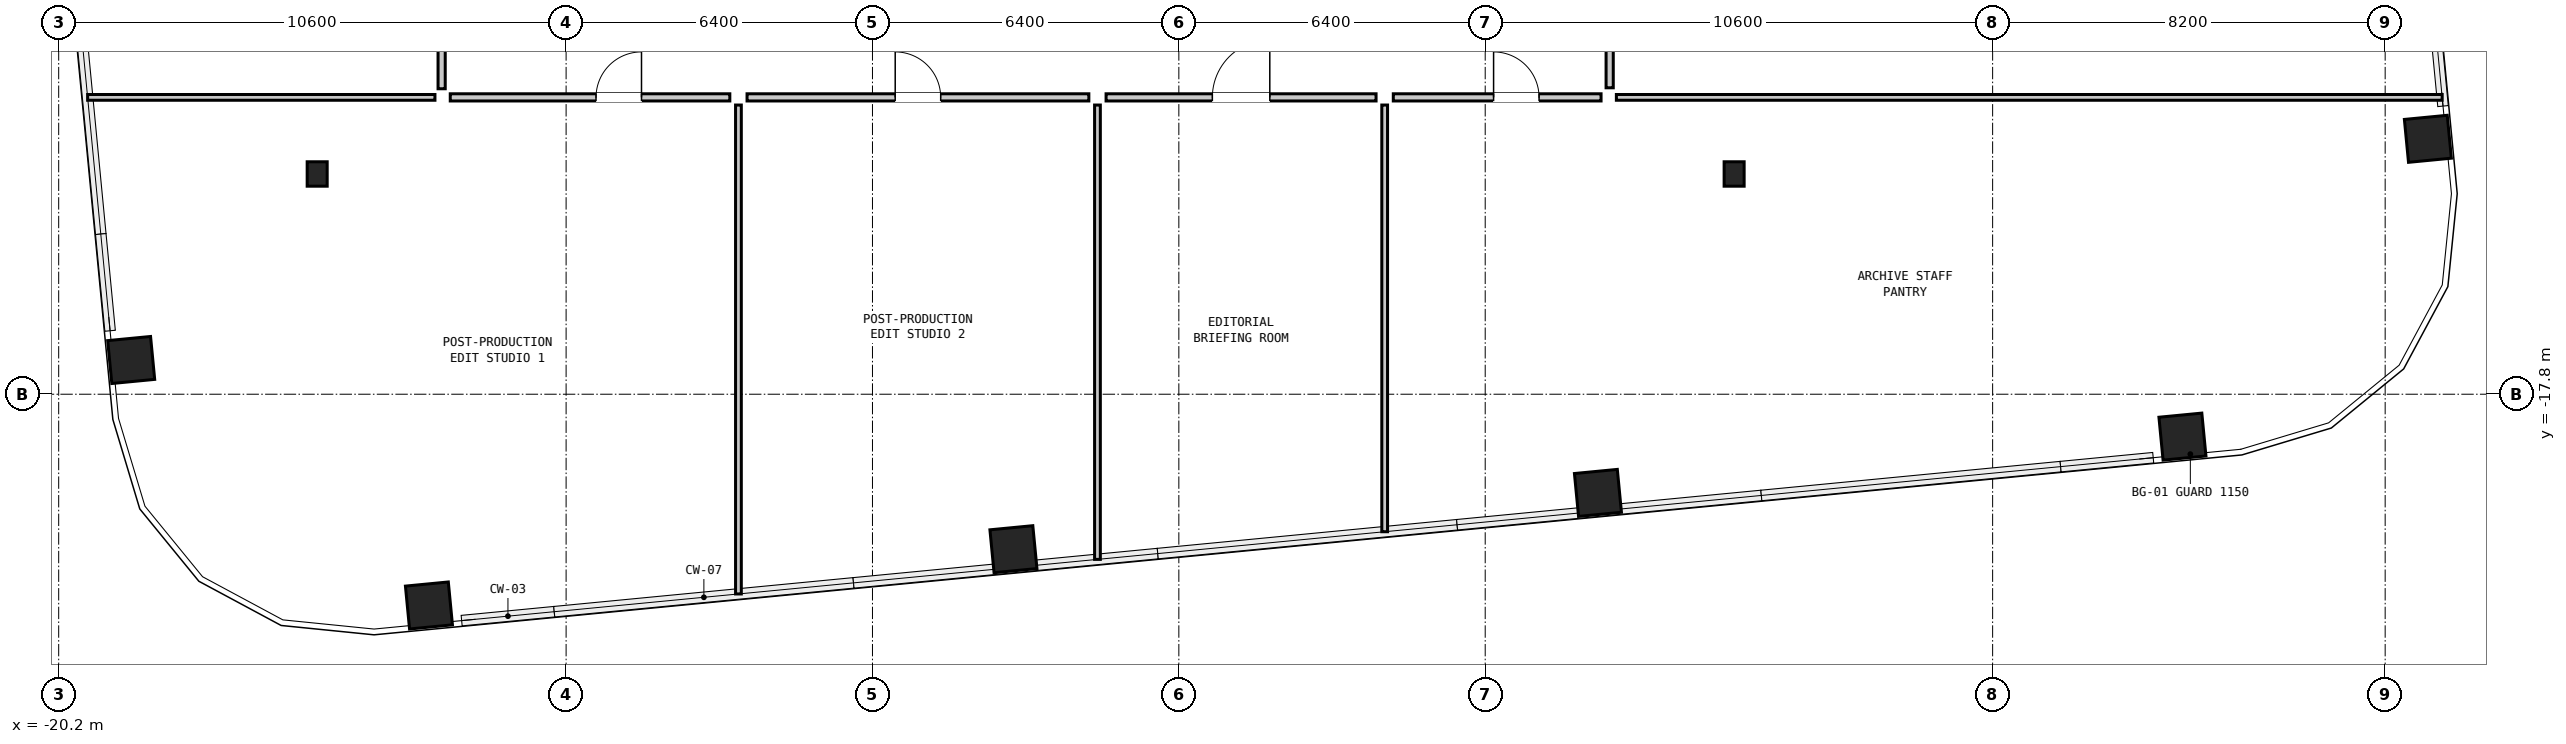
"""IFC4 building model, lengths in metres.
Left out: names, types, materials, properties, quantities, classifications, styles, units other than length and angle.
Written with IfcOpenShell. Run it as: python <this file> out.ifc"""

import sys

from ifc_helpers import new_model, si_unit, direction, frame, frame_2d, origin, origin_2d, place, context, subcontext, project, spatial, rectangle, hollow_rectangle, i_section, extrude, element, fill, save


model = new_model("IFC4")
c1 = context("Model", 3, precision=1e-05, world=origin(), true_north=direction((0.0, 1.0)))
c2 = subcontext(c1, "Body", "Model", "MODEL_VIEW")
j1 = project(units=[si_unit("LENGTHUNIT", "METRE"), si_unit("PLANEANGLEUNIT", "RADIAN")], contexts=[c1])
p1 = place(None, origin())
s1 = spatial("IfcSite", under=j1, at=p1, CompositionType="ELEMENT")
p2 = place(p1, origin())
s2 = spatial("IfcBuilding", under=s1, at=p2, CompositionType="ELEMENT")
p3 = place(p2, frame((0.0, 0.0, 90.8)))
s3 = spatial("IfcBuildingStorey", under=s2, at=p3, CompositionType="ELEMENT", Elevation=90.8)
for number, where, z_axis, x_axis in (
    (1, (-12.465, -22.213, 0.0), (0.0, 0.0, 1.0), (0.995, 0.096, 0.0)),
    (2, (-0.255, -21.037, 0.0), (0.0, 0.0, 1.0), (0.995, 0.096, 0.0)),
    (3, (11.955, -19.861, 0.0), (0.0, 0.0, 1.0), (0.995, 0.096, 0.0)),
    (4, (24.165, -18.686, 0.0), (0.0, 0.0, 1.0), (0.995, 0.096, 0.0)),
    (5, (29.292, -12.465, 0.0), (0.0, 0.0, 1.0), (-0.096, 0.995, 0.0)),
    (6, (-18.686, -17.085, 0.0), (0.0, 0.0, 1.0), (-0.096, 0.995, 0.0)),
):
    element("IfcColumn", number, at=place(p3, frame(where, z_axis=z_axis, x_axis=x_axis)), inside=s3, PredefinedType="COLUMN", context=c2, shape_type="SweptSolid", body=[
        extrude(hollow_rectangle(XDim=0.9, YDim=0.9, WallThickness=0.055, at=origin_2d()), origin(), (0.0, 0.0, 1.0), 3.05),
    ])
for number, where, z_axis, x_axis in (
    (7, (-14.8, -13.2, 0.0), (0.0, 0.0, 1.0), (1.0, 0.0, 0.0)),
    (8, (14.8, -13.2, 0.0), (0.0, 0.0, 1.0), (1.0, 0.0, 0.0)),
):
    element("IfcColumn", number, at=place(p3, frame(where, z_axis=z_axis, x_axis=x_axis)), inside=s3, PredefinedType="COLUMN", context=c2, shape_type="SweptSolid", body=[
        extrude(i_section(OverallWidth=0.418, OverallDepth=0.51, WebThickness=0.042, FlangeThickness=0.068, at=origin_2d()), origin(), (0.0, 0.0, 1.0), 3.05),
    ])
p4 = place(p3, frame((-19.595, -11.6, 0.0), z_axis=(0.0, 0.0, 1.0), x_axis=(1.0, 0.0, 0.0)))
e9 = element("IfcWall", 9, at=p4, inside=s3, PredefinedType="PARTITIONING", context=c2, shape_type="SweptSolid", body=[
    extrude(rectangle(XDim=7.255, YDim=0.12, at=frame_2d((3.628, 0.0))), origin(), (0.0, 0.0, 1.0), 2.274),
])
p5 = place(p3, frame((12.34, -11.6, 0.0), z_axis=(0.0, 0.0, 1.0), x_axis=(1.0, 0.0, 0.0)))
e10 = element("IfcWall", 10, at=p5, inside=s3, PredefinedType="PARTITIONING", context=c2, shape_type="SweptSolid", body=[
    extrude(rectangle(XDim=17.251, YDim=0.12, at=frame_2d((8.625, 0.0))), origin(), (0.0, 0.0, 1.0), 2.274),
])
p6 = place(p3, frame((-6.0, -21.972, 0.0), z_axis=(0.0, 0.0, 1.0), x_axis=(0.0, 1.0, 0.0)))
e11 = element("IfcWall", 11, at=p6, inside=s3, PredefinedType="PARTITIONING", context=c2, shape_type="SweptSolid", body=[
    extrude(rectangle(XDim=10.212, YDim=0.12, at=frame_2d((5.106, 0.0))), origin(), (0.0, 0.0, 1.0), 2.274),
])
p7 = place(p3, frame((1.5, -21.25, 0.0), z_axis=(0.0, 0.0, 1.0), x_axis=(0.0, 1.0, 0.0)))
e12 = element("IfcWall", 12, at=p7, inside=s3, PredefinedType="PARTITIONING", context=c2, shape_type="SweptSolid", body=[
    extrude(rectangle(XDim=9.49, YDim=0.12, at=frame_2d((4.745, 0.0))), origin(), (0.0, 0.0, 1.0), 2.83),
])
p8 = place(p3, frame((7.5, -20.672, 0.0), z_axis=(0.0, 0.0, 1.0), x_axis=(0.0, 1.0, 0.0)))
e13 = element("IfcWall", 13, at=p8, inside=s3, PredefinedType="PARTITIONING", context=c2, shape_type="SweptSolid", body=[
    extrude(rectangle(XDim=8.912, YDim=0.12, at=frame_2d((4.456, 0.0))), origin(), (0.0, 0.0, 1.0), 2.83),
])
p9 = place(p3, frame((-12.02, -11.6, 0.0), z_axis=(0.0, 0.0, 1.0), x_axis=(1.0, 0.0, 0.0)))
e14 = element("IfcWall", 14, at=p9, inside=s3, PredefinedType="PARTITIONING", context=c2, shape_type="SweptSolid", body=[
    extrude(rectangle(XDim=5.84, YDim=0.15, at=frame_2d((2.92, 0.0))), origin(), (0.0, 0.0, 1.0), 2.274),
])
p10 = place(p9, frame((3.045, 0.0, 0.0)))
e15 = element("IfcOpeningElement", 15, at=p10, cuts=e14, PredefinedType="OPENING", context=c2, shape_type="SweptSolid", body=[
    extrude(rectangle(XDim=0.95, YDim=2.1, at=frame_2d((0.475, 1.05))), frame((0.0, 0.087, 0.0), z_axis=(0.0, -1.0, 0.0), x_axis=(1.0, 0.0, 0.0)), (0.0, 0.0, 1.0), 0.174),
])
p11 = place(p3, frame((-5.82, -11.6, 0.0), z_axis=(0.0, 0.0, 1.0), x_axis=(1.0, 0.0, 0.0)))
e16 = element("IfcWall", 16, at=p11, inside=s3, PredefinedType="PARTITIONING", context=c2, shape_type="SweptSolid", body=[
    extrude(rectangle(XDim=7.14, YDim=0.15, at=frame_2d((3.57, 0.0))), origin(), (0.0, 0.0, 1.0), 2.83),
])
p12 = place(p11, frame((3.095, 0.0, 0.0)))
e17 = element("IfcOpeningElement", 17, at=p12, cuts=e16, PredefinedType="OPENING", context=c2, shape_type="SweptSolid", body=[
    extrude(rectangle(XDim=0.95, YDim=2.1, at=frame_2d((0.475, 1.05))), frame((0.0, 0.087, 0.0), z_axis=(0.0, -1.0, 0.0), x_axis=(1.0, 0.0, 0.0)), (0.0, 0.0, 1.0), 0.174),
])
p13 = place(p3, frame((1.68, -11.6, 0.0), z_axis=(0.0, 0.0, 1.0), x_axis=(1.0, 0.0, 0.0)))
e18 = element("IfcWall", 18, at=p13, inside=s3, PredefinedType="PARTITIONING", context=c2, shape_type="SweptSolid", body=[
    extrude(rectangle(XDim=5.64, YDim=0.15, at=frame_2d((2.82, 0.0))), origin(), (0.0, 0.0, 1.0), 2.83),
])
p14 = place(p13, frame((2.22, 0.0, 0.0)))
e19 = element("IfcOpeningElement", 19, at=p14, cuts=e18, PredefinedType="OPENING", context=c2, shape_type="SweptSolid", body=[
    extrude(rectangle(XDim=1.2, YDim=2.1, at=frame_2d((0.6, 1.05))), frame((0.0, 0.087, 0.0), z_axis=(0.0, -1.0, 0.0), x_axis=(1.0, 0.0, 0.0)), (0.0, 0.0, 1.0), 0.174),
])
p15 = place(p3, frame((7.68, -11.6, 0.0), z_axis=(0.0, 0.0, 1.0), x_axis=(1.0, 0.0, 0.0)))
e20 = element("IfcWall", 20, at=p15, inside=s3, PredefinedType="PARTITIONING", context=c2, shape_type="SweptSolid", body=[
    extrude(rectangle(XDim=4.34, YDim=0.15, at=frame_2d((2.17, 0.0))), origin(), (0.0, 0.0, 1.0), 2.274),
])
p16 = place(p15, frame((2.095, 0.0, 0.0)))
e21 = element("IfcOpeningElement", 21, at=p16, cuts=e20, PredefinedType="OPENING", context=c2, shape_type="SweptSolid", body=[
    extrude(rectangle(XDim=0.95, YDim=2.1, at=frame_2d((0.475, 1.05))), frame((0.0, 0.087, 0.0), z_axis=(0.0, -1.0, 0.0), x_axis=(1.0, 0.0, 0.0)), (0.0, 0.0, 1.0), 0.174),
])
p17 = place(p3, frame((-12.2, -11.42, 0.0), z_axis=(0.0, 0.0, 1.0), x_axis=(0.0, 1.0, 0.0)))
e22 = element("IfcWall", 22, at=p17, inside=s3, PredefinedType="PARTITIONING", context=c2, shape_type="SweptSolid", body=[
    extrude(rectangle(XDim=8.24, YDim=0.15, at=frame_2d((4.12, 0.0))), origin(), (0.0, 0.0, 1.0), 2.83),
])
p18 = place(p17, frame((3.645, 0.0, 0.0)))
e23 = element("IfcOpeningElement", 23, at=p18, cuts=e22, PredefinedType="OPENING", context=c2, shape_type="SweptSolid", body=[
    extrude(rectangle(XDim=0.95, YDim=2.1, at=frame_2d((0.475, 1.05))), frame((0.0, 0.087, 0.0), z_axis=(0.0, -1.0, 0.0), x_axis=(1.0, 0.0, 0.0)), (0.0, 0.0, 1.0), 0.174),
])
p19 = place(p3, frame((12.2, -11.4, 0.0), z_axis=(0.0, 0.0, 1.0), x_axis=(0.0, 1.0, 0.0)))
e24 = element("IfcWall", 24, at=p19, inside=s3, PredefinedType="PARTITIONING", context=c2, shape_type="SweptSolid", body=[
    extrude(rectangle(XDim=8.84, YDim=0.15, at=frame_2d((4.42, 0.0))), origin(), (0.0, 0.0, 1.0), 2.83),
])
p20 = place(p19, frame((3.945, 0.0, 0.0)))
e25 = element("IfcOpeningElement", 25, at=p20, cuts=e24, PredefinedType="OPENING", context=c2, shape_type="SweptSolid", body=[
    extrude(rectangle(XDim=0.95, YDim=2.1, at=frame_2d((0.475, 1.05))), frame((0.0, 0.087, 0.0), z_axis=(0.0, -1.0, 0.0), x_axis=(1.0, 0.0, 0.0)), (0.0, 0.0, 1.0), 0.174),
])
p21 = place(p10, origin())
e26 = element("IfcDoor", 26, at=p21, inside=s3, OperationType="SINGLE_SWING_RIGHT", PredefinedType="DOOR", context=c2, shape_type="SweptSolid", body=[
    extrude(rectangle(XDim=0.95, YDim=2.1, at=frame_2d((0.475, 1.05))), frame((0.0, 0.025, 0.0), z_axis=(0.0, -1.0, 0.0), x_axis=(1.0, 0.0, 0.0)), (0.0, 0.0, 1.0), 0.05),
])
fill(e15, e26)
p22 = place(p12, origin())
e27 = element("IfcDoor", 27, at=p22, inside=s3, OperationType="SINGLE_SWING_LEFT", PredefinedType="DOOR", context=c2, shape_type="SweptSolid", body=[
    extrude(rectangle(XDim=0.95, YDim=2.1, at=frame_2d((0.475, 1.05))), frame((0.0, 0.025, 0.0), z_axis=(0.0, -1.0, 0.0), x_axis=(1.0, 0.0, 0.0)), (0.0, 0.0, 1.0), 0.05),
])
fill(e17, e27)
p23 = place(p14, origin())
e28 = element("IfcDoor", 28, at=p23, inside=s3, OperationType="SINGLE_SWING_RIGHT", PredefinedType="DOOR", context=c2, shape_type="SweptSolid", body=[
    extrude(rectangle(XDim=1.2, YDim=2.1, at=frame_2d((0.6, 1.05))), frame((0.0, 0.025, 0.0), z_axis=(0.0, -1.0, 0.0), x_axis=(1.0, 0.0, 0.0)), (0.0, 0.0, 1.0), 0.05),
])
fill(e19, e28)
p24 = place(p16, origin())
e29 = element("IfcDoor", 29, at=p24, inside=s3, OperationType="SINGLE_SWING_LEFT", PredefinedType="DOOR", context=c2, shape_type="SweptSolid", body=[
    extrude(rectangle(XDim=0.95, YDim=2.1, at=frame_2d((0.475, 1.05))), frame((0.0, 0.025, 0.0), z_axis=(0.0, -1.0, 0.0), x_axis=(1.0, 0.0, 0.0)), (0.0, 0.0, 1.0), 0.05),
])
fill(e21, e29)
save(model, sys.argv[1])
